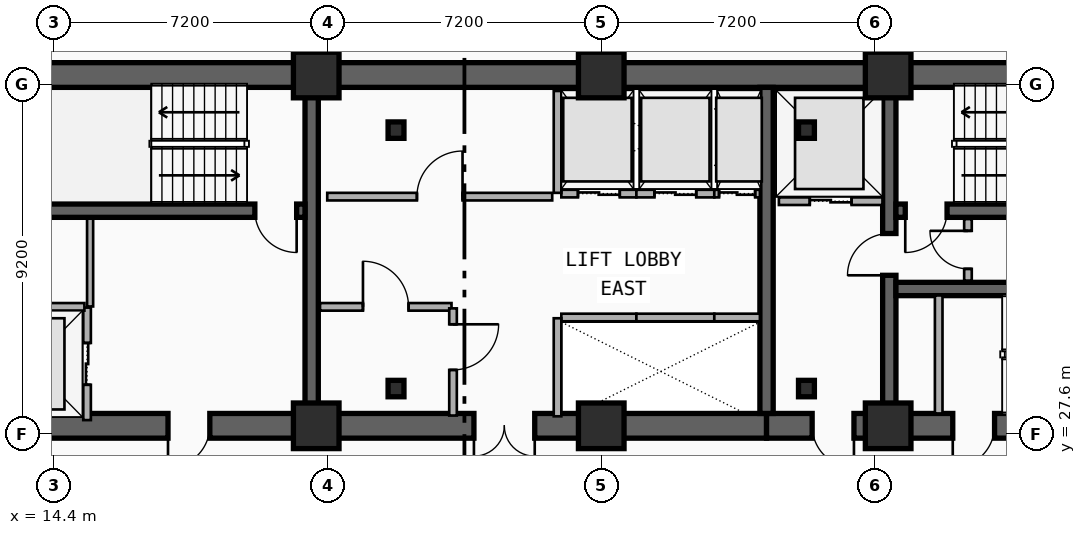
"""IFC4 building model, lengths in metres.
Left out: names, types, materials, properties, quantities, classifications, styles, units other than length and angle.
Written with IfcOpenShell. Run it as: python <this file> out.ifc"""

import sys

from ifc_helpers import new_model, si_unit, direction, frame, frame_2d, origin, origin_2d, place, context, subcontext, project, spatial, rectangle, i_section, extrude, element, fill, save


model = new_model("IFC4")
c1 = context("Model", 3, precision=1e-05, world=origin(), true_north=direction((0.0, 1.0)))
c2 = subcontext(c1, "Body", "Model", "MODEL_VIEW")
j1 = project(units=[si_unit("LENGTHUNIT", "METRE"), si_unit("PLANEANGLEUNIT", "RADIAN")], contexts=[c1])
p1 = place(None, origin())
s1 = spatial("IfcSite", under=j1, at=p1, CompositionType="ELEMENT")
p2 = place(p1, origin())
s2 = spatial("IfcBuilding", under=s1, at=p2, CompositionType="ELEMENT")
p3 = place(p2, frame((0.0, 0.0, 97.8)))
s3 = spatial("IfcBuildingStorey", under=s2, at=p3, CompositionType="ELEMENT", Elevation=97.8)
p4 = place(p3, frame((12.15, 37.05, 0.0), z_axis=(0.0, 0.0, 1.0), x_axis=(1.0, 0.0, 0.0)))
e1 = element("IfcWall", 1, at=p4, inside=s3, PredefinedType="SHEAR", context=c2, shape_type="SweptSolid", body=[
    extrude(rectangle(XDim=33.23, YDim=0.65, at=frame_2d((16.615, 0.0))), origin(), (0.0, 0.0, 1.0), 3.5),
])
p5 = place(p3, frame((21.18, 27.82, 0.0), z_axis=(0.0, 0.0, 1.0), x_axis=(-1.0, 0.0, 0.0)))
e2 = element("IfcWall", 2, at=p5, inside=s3, PredefinedType="SHEAR", context=c2, shape_type="SweptSolid", body=[
    extrude(rectangle(XDim=9.03, YDim=0.65, at=frame_2d((4.515, 0.0))), origin(), (0.0, 0.0, 1.0), 3.5),
])
p6 = place(p5, frame((2.68, 0.0, 0.0)))
e3 = element("IfcOpeningElement", 3, at=p6, cuts=e2, PredefinedType="OPENING", context=c2, shape_type="SweptSolid", body=[
    extrude(rectangle(XDim=1.1, YDim=2.15, at=frame_2d((0.55, 1.075))), frame((0.0, 0.335, 0.0), z_axis=(0.0, -1.0, 0.0), x_axis=(1.0, 0.0, 0.0)), (0.0, 0.0, 1.0), 0.67),
])
p7 = place(p3, frame((33.15, 27.82, 0.0), z_axis=(0.0, 0.0, 1.0), x_axis=(-1.0, 0.0, 0.0)))
e4 = element("IfcWall", 4, at=p7, inside=s3, PredefinedType="SHEAR", context=c2, shape_type="SweptSolid", body=[
    extrude(rectangle(XDim=11.97, YDim=0.65, at=frame_2d((5.985, 0.0))), origin(), (0.0, 0.0, 1.0), 3.5),
])
p8 = place(p7, frame((6.1, 0.0, 0.0)))
e5 = element("IfcOpeningElement", 5, at=p8, cuts=e4, PredefinedType="OPENING", context=c2, shape_type="SweptSolid", body=[
    extrude(rectangle(XDim=1.6, YDim=2.2, at=frame_2d((0.8, 1.1))), frame((0.0, 0.335, 0.0), z_axis=(0.0, -1.0, 0.0), x_axis=(1.0, 0.0, 0.0)), (0.0, 0.0, 1.0), 0.67),
])
p9 = place(p3, frame((45.38, 27.82, 0.0), z_axis=(0.0, 0.0, 1.0), x_axis=(-1.0, 0.0, 0.0)))
e6 = element("IfcWall", 6, at=p9, inside=s3, PredefinedType="SHEAR", context=c2, shape_type="SweptSolid", body=[
    extrude(rectangle(XDim=12.23, YDim=0.65, at=frame_2d((6.115, 0.0))), origin(), (0.0, 0.0, 1.0), 3.5),
])
p10 = place(p9, frame((9.93, 0.0, 0.0)))
e7 = element("IfcOpeningElement", 7, at=p10, cuts=e6, PredefinedType="OPENING", context=c2, shape_type="SweptSolid", body=[
    extrude(rectangle(XDim=1.1, YDim=2.15, at=frame_2d((0.55, 1.075))), frame((0.0, 0.335, 0.0), z_axis=(0.0, -1.0, 0.0), x_axis=(1.0, 0.0, 0.0)), (0.0, 0.0, 1.0), 0.67),
])
p11 = place(p9, frame((6.23, 0.0, 0.0)))
e8 = element("IfcOpeningElement", 8, at=p11, cuts=e6, PredefinedType="OPENING", context=c2, shape_type="SweptSolid", body=[
    extrude(rectangle(XDim=1.1, YDim=2.15, at=frame_2d((0.55, 1.075))), frame((0.0, 0.335, 0.0), z_axis=(0.0, -1.0, 0.0), x_axis=(1.0, 0.0, 0.0)), (0.0, 0.0, 1.0), 0.67),
])
for number, where, z_axis, x_axis in (
    (9, (21.18, 28.145, 0.0), (0.0, 0.0, 1.0), (0.0, 1.0, 0.0)),
    (10, (33.15, 28.145, 0.0), (0.0, 0.0, 1.0), (0.0, 1.0, 0.0)),
):
    element("IfcWall", number, at=place(p3, frame(where, z_axis=z_axis, x_axis=x_axis)), inside=s3, PredefinedType="SHEAR", context=c2, shape_type="SweptSolid", body=[
        extrude(rectangle(XDim=8.58, YDim=0.35, at=frame_2d((4.29, 0.0))), origin(), (0.0, 0.0, 1.0), 3.5),
    ])
p12 = place(p3, frame((36.38, 28.145, 0.0), z_axis=(0.0, 0.0, 1.0), x_axis=(0.0, 1.0, 0.0)))
e11 = element("IfcWall", 11, at=p12, inside=s3, PredefinedType="SHEAR", context=c2, shape_type="SweptSolid", body=[
    extrude(rectangle(XDim=8.58, YDim=0.35, at=frame_2d((4.29, 0.0))), origin(), (0.0, 0.0, 1.0), 3.5),
])
p13 = place(p12, frame((3.635, 0.0, 0.0)))
e12 = element("IfcOpeningElement", 12, at=p13, cuts=e11, PredefinedType="OPENING", context=c2, shape_type="SweptSolid", body=[
    extrude(rectangle(XDim=1.1, YDim=2.15, at=frame_2d((0.55, 1.075))), frame((0.0, 0.185, 0.0), z_axis=(0.0, -1.0, 0.0), x_axis=(1.0, 0.0, 0.0)), (0.0, 0.0, 1.0), 0.37),
])
p14 = place(p3, frame((21.005, 33.48, 0.0), z_axis=(0.0, 0.0, 1.0), x_axis=(-1.0, 0.0, 0.0)))
e13 = element("IfcWall", 13, at=p14, inside=s3, PredefinedType="SHEAR", context=c2, shape_type="SweptSolid", body=[
    extrude(rectangle(XDim=8.53, YDim=0.35, at=frame_2d((4.265, 0.0))), origin(), (0.0, 0.0, 1.0), 3.5),
])
p15 = place(p14, frame((0.22, 0.0, 0.0)))
e14 = element("IfcOpeningElement", 14, at=p15, cuts=e13, PredefinedType="OPENING", context=c2, shape_type="SweptSolid", body=[
    extrude(rectangle(XDim=1.1, YDim=2.15, at=frame_2d((0.55, 1.075))), frame((0.0, 0.185, 0.0), z_axis=(0.0, -1.0, 0.0), x_axis=(1.0, 0.0, 0.0)), (0.0, 0.0, 1.0), 0.37),
])
p16 = place(p3, frame((45.055, 33.48, 0.0), z_axis=(0.0, 0.0, 1.0), x_axis=(-1.0, 0.0, 0.0)))
e15 = element("IfcWall", 15, at=p16, inside=s3, PredefinedType="SHEAR", context=c2, shape_type="SweptSolid", body=[
    extrude(rectangle(XDim=8.5, YDim=0.35, at=frame_2d((4.25, 0.0))), origin(), (0.0, 0.0, 1.0), 3.5),
])
p17 = place(p16, frame((7.155, 0.0, 0.0)))
e16 = element("IfcOpeningElement", 16, at=p17, cuts=e15, PredefinedType="OPENING", context=c2, shape_type="SweptSolid", body=[
    extrude(rectangle(XDim=1.1, YDim=2.15, at=frame_2d((0.55, 1.075))), frame((0.0, 0.185, 0.0), z_axis=(0.0, -1.0, 0.0), x_axis=(1.0, 0.0, 0.0)), (0.0, 0.0, 1.0), 0.37),
])
p18 = place(p3, frame((36.555, 31.42, 0.0), z_axis=(0.0, 0.0, 1.0), x_axis=(1.0, 0.0, 0.0)))
e17 = element("IfcWall", 17, at=p18, inside=s3, PredefinedType="SHEAR", context=c2, shape_type="SweptSolid", body=[
    extrude(rectangle(XDim=8.5, YDim=0.35, at=frame_2d((4.25, 0.0))), origin(), (0.0, 0.0, 1.0), 3.5),
])
for number, where, z_axis, x_axis in (
    (18, (23.4, 28.8, 0.0), (0.0, 0.0, 1.0), (1.0, 0.0, 0.0)),
    (19, (34.2, 28.8, 0.0), (0.0, 0.0, 1.0), (1.0, 0.0, 0.0)),
    (20, (34.2, 35.6, 0.0), (0.0, 0.0, 1.0), (1.0, 0.0, 0.0)),
    (21, (23.4, 35.6, 0.0), (0.0, 0.0, 1.0), (1.0, 0.0, 0.0)),
):
    element("IfcColumn", number, at=place(p3, frame(where, z_axis=z_axis, x_axis=x_axis)), inside=s3, PredefinedType="COLUMN", context=c2, shape_type="SweptSolid", body=[
        extrude(i_section(OverallWidth=0.418, OverallDepth=0.432, WebThickness=0.035, FlangeThickness=0.056, FilletRadius=0.015, at=origin_2d()), origin(), (0.0, 0.0, 1.0), 3.5),
    ])
for number, where, z_axis, x_axis in (
    (22, (21.3, 27.82, 0.0), (0.0, 0.0, 1.0), (1.0, 0.0, 0.0)),
    (23, (21.3, 37.05, 0.0), (0.0, 0.0, 1.0), (1.0, 0.0, 0.0)),
    (24, (28.8, 27.82, 0.0), (0.0, 0.0, 1.0), (1.0, 0.0, 0.0)),
    (25, (28.8, 37.05, 0.0), (0.0, 0.0, 1.0), (1.0, 0.0, 0.0)),
    (26, (36.35, 27.82, 0.0), (0.0, 0.0, 1.0), (1.0, 0.0, 0.0)),
    (27, (36.35, 37.05, 0.0), (0.0, 0.0, 1.0), (1.0, 0.0, 0.0)),
):
    element("IfcColumn", number, at=place(p3, frame(where, z_axis=z_axis, x_axis=x_axis)), inside=s3, PredefinedType="COLUMN", context=c2, shape_type="SweptSolid", body=[
        extrude(rectangle(XDim=1.2, YDim=1.2, at=origin_2d()), origin(), (0.0, 0.0, 1.0), 3.5),
    ])
p19 = place(p3, frame((15.27, 27.97, 0.0), z_axis=(0.0, 0.0, 1.0), x_axis=(0.0, 1.0, 0.0)))
e28 = element("IfcWall", 28, at=p19, inside=s3, PredefinedType="PARTITIONING", context=c2, shape_type="SweptSolid", body=[
    extrude(rectangle(XDim=2.96, YDim=0.2, at=frame_2d((1.48, 0.0))), origin(), (0.0, 0.0, 1.0), 2.212),
])
p20 = place(p19, frame((0.93, 0.0, 0.0)))
e29 = element("IfcOpeningElement", 29, at=p20, cuts=e28, PredefinedType="OPENING", context=c2, shape_type="SweptSolid", body=[
    extrude(rectangle(XDim=1.1, YDim=2.15, at=frame_2d((0.55, 1.075))), frame((0.0, 0.11, 0.0), z_axis=(0.0, -1.0, 0.0), x_axis=(1.0, 0.0, 0.0)), (0.0, 0.0, 1.0), 0.22),
])
p21 = place(p3, frame((12.45, 30.95, 0.0), z_axis=(0.0, 0.0, 1.0), x_axis=(1.0, 0.0, 0.0)))
e30 = element("IfcWall", 30, at=p21, inside=s3, PredefinedType="PARTITIONING", context=c2, shape_type="SweptSolid", body=[
    extrude(rectangle(XDim=2.75, YDim=0.2, at=frame_2d((1.375, 0.0))), origin(), (0.0, 0.0, 1.0), 2.212),
])
p22 = place(p3, frame((33.475, 33.73, 0.0), z_axis=(0.0, 0.0, 1.0), x_axis=(1.0, 0.0, 0.0)))
e31 = element("IfcWall", 31, at=p22, inside=s3, PredefinedType="PARTITIONING", context=c2, shape_type="SweptSolid", body=[
    extrude(rectangle(XDim=2.725, YDim=0.2, at=frame_2d((1.362, 0.0))), origin(), (0.0, 0.0, 1.0), 2.212),
])
p23 = place(p22, frame((0.812, 0.0, 0.0)))
e32 = element("IfcOpeningElement", 32, at=p23, cuts=e31, PredefinedType="OPENING", context=c2, shape_type="SweptSolid", body=[
    extrude(rectangle(XDim=1.1, YDim=2.15, at=frame_2d((0.55, 1.075))), frame((0.0, 0.11, 0.0), z_axis=(0.0, -1.0, 0.0), x_axis=(1.0, 0.0, 0.0)), (0.0, 0.0, 1.0), 0.22),
])
p24 = place(p3, frame((27.75, 30.67, 0.0), z_axis=(0.0, 0.0, 1.0), x_axis=(1.0, 0.0, 0.0)))
e33 = element("IfcWall", 33, at=p24, inside=s3, PredefinedType="PARTITIONING", context=c2, shape_type="SweptSolid", body=[
    extrude(rectangle(XDim=1.975, YDim=0.2, at=frame_2d((0.988, 0.0))), origin(), (0.0, 0.0, 1.0), 2.212),
])
p25 = place(p3, frame((27.65, 28.07, 0.0), z_axis=(0.0, 0.0, 1.0), x_axis=(0.0, 1.0, 0.0)))
e34 = element("IfcWall", 34, at=p25, inside=s3, PredefinedType="PARTITIONING", context=c2, shape_type="SweptSolid", body=[
    extrude(rectangle(XDim=2.58, YDim=0.2, at=frame_2d((1.29, 0.0))), origin(), (0.0, 0.0, 1.0), 2.212),
])
p26 = place(p3, frame((29.725, 30.67, 0.0), z_axis=(0.0, 0.0, 1.0), x_axis=(1.0, 0.0, 0.0)))
e35 = element("IfcWall", 35, at=p26, inside=s3, PredefinedType="PARTITIONING", context=c2, shape_type="SweptSolid", body=[
    extrude(rectangle(XDim=2.05, YDim=0.2, at=frame_2d((1.025, 0.0))), origin(), (0.0, 0.0, 1.0), 2.62),
])
p27 = place(p3, frame((31.775, 30.67, 0.0), z_axis=(0.0, 0.0, 1.0), x_axis=(1.0, 0.0, 0.0)))
e36 = element("IfcWall", 36, at=p27, inside=s3, PredefinedType="PARTITIONING", context=c2, shape_type="SweptSolid", body=[
    extrude(rectangle(XDim=1.2, YDim=0.2, at=frame_2d((0.6, 0.0))), origin(), (0.0, 0.0, 1.0), 2.62),
])
p28 = place(p3, frame((27.75, 33.93, 0.0), z_axis=(0.0, 0.0, 1.0), x_axis=(1.0, 0.0, 0.0)))
e37 = element("IfcWall", 37, at=p28, inside=s3, PredefinedType="PARTITIONING", context=c2, shape_type="SweptSolid", body=[
    extrude(rectangle(XDim=1.975, YDim=0.2, at=frame_2d((0.988, 0.0))), origin(), (0.0, 0.0, 1.0), 2.212),
])
p29 = place(p28, frame((0.438, 0.0, 0.0)))
e38 = element("IfcOpeningElement", 38, at=p29, cuts=e37, PredefinedType="OPENING", context=c2, shape_type="SweptSolid", body=[
    extrude(rectangle(XDim=1.1, YDim=2.15, at=frame_2d((0.55, 1.075))), frame((0.0, 0.11, 0.0), z_axis=(0.0, -1.0, 0.0), x_axis=(1.0, 0.0, 0.0)), (0.0, 0.0, 1.0), 0.22),
])
p30 = place(p3, frame((27.65, 33.95, 0.0), z_axis=(0.0, 0.0, 1.0), x_axis=(0.0, 1.0, 0.0)))
e39 = element("IfcWall", 39, at=p30, inside=s3, PredefinedType="PARTITIONING", context=c2, shape_type="SweptSolid", body=[
    extrude(rectangle(XDim=2.68, YDim=0.2, at=frame_2d((1.34, 0.0))), origin(), (0.0, 0.0, 1.0), 2.212),
])
p31 = place(p3, frame((29.725, 33.93, 0.0), z_axis=(0.0, 0.0, 1.0), x_axis=(1.0, 0.0, 0.0)))
e40 = element("IfcWall", 40, at=p31, inside=s3, PredefinedType="PARTITIONING", context=c2, shape_type="SweptSolid", body=[
    extrude(rectangle(XDim=2.05, YDim=0.2, at=frame_2d((1.025, 0.0))), origin(), (0.0, 0.0, 1.0), 3.24),
])
p32 = place(p31, frame((0.475, 0.0, 0.0)))
e41 = element("IfcOpeningElement", 41, at=p32, cuts=e40, PredefinedType="OPENING", context=c2, shape_type="SweptSolid", body=[
    extrude(rectangle(XDim=1.1, YDim=2.15, at=frame_2d((0.55, 1.075))), frame((0.0, 0.11, 0.0), z_axis=(0.0, -1.0, 0.0), x_axis=(1.0, 0.0, 0.0)), (0.0, 0.0, 1.0), 0.22),
])
p33 = place(p3, frame((31.775, 33.93, 0.0), z_axis=(0.0, 0.0, 1.0), x_axis=(1.0, 0.0, 0.0)))
e42 = element("IfcWall", 42, at=p33, inside=s3, PredefinedType="PARTITIONING", context=c2, shape_type="SweptSolid", body=[
    extrude(rectangle(XDim=1.2, YDim=0.2, at=frame_2d((0.6, 0.0))), origin(), (0.0, 0.0, 1.0), 3.24),
])
p34 = place(p33, frame((0.125, 0.0, 0.0)))
e43 = element("IfcOpeningElement", 43, at=p34, cuts=e42, PredefinedType="OPENING", context=c2, shape_type="SweptSolid", body=[
    extrude(rectangle(XDim=0.95, YDim=2.15, at=frame_2d((0.475, 1.075))), frame((0.0, 0.11, 0.0), z_axis=(0.0, -1.0, 0.0), x_axis=(1.0, 0.0, 0.0)), (0.0, 0.0, 1.0), 0.22),
])
p35 = place(p3, frame((37.68, 28.145, 0.0), z_axis=(0.0, 0.0, 1.0), x_axis=(0.0, 1.0, 0.0)))
e44 = element("IfcWall", 44, at=p35, inside=s3, PredefinedType="PARTITIONING", context=c2, shape_type="SweptSolid", body=[
    extrude(rectangle(XDim=3.105, YDim=0.2, at=frame_2d((1.552, 0.0))), origin(), (0.0, 0.0, 1.0), 2.62),
])
p36 = place(p3, frame((38.45, 31.64, 0.0), z_axis=(0.0, 0.0, 1.0), x_axis=(0.0, 1.0, 0.0)))
e45 = element("IfcWall", 45, at=p36, inside=s3, PredefinedType="PARTITIONING", context=c2, shape_type="SweptSolid", body=[
    extrude(rectangle(XDim=1.62, YDim=0.2, at=frame_2d((0.81, 0.0))), origin(), (0.0, 0.0, 1.0), 3.24),
])
p37 = place(p36, frame((0.31, 0.0, 0.0)))
e46 = element("IfcOpeningElement", 46, at=p37, cuts=e45, PredefinedType="OPENING", context=c2, shape_type="SweptSolid", body=[
    extrude(rectangle(XDim=1.0, YDim=2.15, at=frame_2d((0.5, 1.075))), frame((0.0, 0.11, 0.0), z_axis=(0.0, -1.0, 0.0), x_axis=(1.0, 0.0, 0.0)), (0.0, 0.0, 1.0), 0.22),
])
p38 = place(p3, frame((21.4, 30.95, 0.0), z_axis=(0.0, 0.0, 1.0), x_axis=(1.0, 0.0, 0.0)))
e47 = element("IfcWall", 47, at=p38, inside=s3, PredefinedType="PARTITIONING", context=c2, shape_type="SweptSolid", body=[
    extrude(rectangle(XDim=3.46, YDim=0.2, at=frame_2d((1.73, 0.0))), origin(), (0.0, 0.0, 1.0), 2.28),
])
p39 = place(p38, frame((1.13, 0.0, 0.0)))
e48 = element("IfcOpeningElement", 48, at=p39, cuts=e47, PredefinedType="OPENING", context=c2, shape_type="SweptSolid", body=[
    extrude(rectangle(XDim=1.2, YDim=2.15, at=frame_2d((0.6, 1.075))), frame((0.0, 0.11, 0.0), z_axis=(0.0, -1.0, 0.0), x_axis=(1.0, 0.0, 0.0)), (0.0, 0.0, 1.0), 0.22),
])
p40 = place(p3, frame((21.59, 33.85, 0.0), z_axis=(0.0, 0.0, 1.0), x_axis=(1.0, 0.0, 0.0)))
e49 = element("IfcWall", 49, at=p40, inside=s3, PredefinedType="PARTITIONING", context=c2, shape_type="SweptSolid", body=[
    extrude(rectangle(XDim=5.92, YDim=0.2, at=frame_2d((2.96, 0.0))), origin(), (0.0, 0.0, 1.0), 2.28),
])
p41 = place(p40, frame((2.36, 0.0, 0.0)))
e50 = element("IfcOpeningElement", 50, at=p41, cuts=e49, PredefinedType="OPENING", context=c2, shape_type="SweptSolid", body=[
    extrude(rectangle(XDim=1.2, YDim=2.15, at=frame_2d((0.6, 1.075))), frame((0.0, 0.11, 0.0), z_axis=(0.0, -1.0, 0.0), x_axis=(1.0, 0.0, 0.0)), (0.0, 0.0, 1.0), 0.22),
])
p42 = place(p3, frame((24.9, 30.91, 0.0), z_axis=(0.0, 0.0, 1.0), x_axis=(0.0, -1.0, 0.0)))
e51 = element("IfcWall", 51, at=p42, inside=s3, PredefinedType="PARTITIONING", context=c2, shape_type="SweptSolid", body=[
    extrude(rectangle(XDim=2.82, YDim=0.2, at=frame_2d((1.41, 0.0))), origin(), (0.0, 0.0, 1.0), 2.62),
])
p43 = place(p42, frame((0.419, 0.0, 0.0)))
e52 = element("IfcOpeningElement", 52, at=p43, cuts=e51, PredefinedType="OPENING", context=c2, shape_type="SweptSolid", body=[
    extrude(rectangle(XDim=1.2, YDim=2.15, at=frame_2d((0.6, 1.075))), frame((0.0, 0.11, 0.0), z_axis=(0.0, -1.0, 0.0), x_axis=(1.0, 0.0, 0.0)), (0.0, 0.0, 1.0), 0.22),
])
p44 = place(p3, frame((15.35, 30.96, 0.0), z_axis=(0.0, 0.0, 1.0), x_axis=(0.0, 1.0, 0.0)))
e53 = element("IfcWall", 53, at=p44, inside=s3, PredefinedType="PARTITIONING", context=c2, shape_type="SweptSolid", body=[
    extrude(rectangle(XDim=2.31, YDim=0.16, at=frame_2d((1.155, 0.0))), origin(), (0.0, 0.0, 1.0), 3.24),
])
p45 = place(p20, origin())
e54 = element("IfcDoor", 54, at=p45, inside=s3, OperationType="DOUBLE_DOOR_SLIDING", PredefinedType="DOOR", context=c2, shape_type="SweptSolid", body=[
    extrude(rectangle(XDim=1.1, YDim=2.15, at=frame_2d((0.55, 1.075))), frame((0.0, 0.025, 0.0), z_axis=(0.0, -1.0, 0.0), x_axis=(1.0, 0.0, 0.0)), (0.0, 0.0, 1.0), 0.05),
])
fill(e29, e54)
p46 = place(p23, origin())
e55 = element("IfcDoor", 55, at=p46, inside=s3, OperationType="DOUBLE_DOOR_SLIDING", PredefinedType="DOOR", context=c2, shape_type="SweptSolid", body=[
    extrude(rectangle(XDim=1.1, YDim=2.15, at=frame_2d((0.55, 1.075))), frame((0.0, 0.025, 0.0), z_axis=(0.0, -1.0, 0.0), x_axis=(1.0, 0.0, 0.0)), (0.0, 0.0, 1.0), 0.05),
])
fill(e32, e55)
p47 = place(p29, origin())
e56 = element("IfcDoor", 56, at=p47, inside=s3, OperationType="DOUBLE_DOOR_SLIDING", PredefinedType="DOOR", context=c2, shape_type="SweptSolid", body=[
    extrude(rectangle(XDim=1.1, YDim=2.15, at=frame_2d((0.55, 1.075))), frame((0.0, 0.025, 0.0), z_axis=(0.0, -1.0, 0.0), x_axis=(1.0, 0.0, 0.0)), (0.0, 0.0, 1.0), 0.05),
])
fill(e38, e56)
p48 = place(p32, origin())
e57 = element("IfcDoor", 57, at=p48, inside=s3, OperationType="DOUBLE_DOOR_SLIDING", PredefinedType="DOOR", context=c2, shape_type="SweptSolid", body=[
    extrude(rectangle(XDim=1.1, YDim=2.15, at=frame_2d((0.55, 1.075))), frame((0.0, 0.025, 0.0), z_axis=(0.0, -1.0, 0.0), x_axis=(1.0, 0.0, 0.0)), (0.0, 0.0, 1.0), 0.05),
])
fill(e41, e57)
p49 = place(p34, origin())
e58 = element("IfcDoor", 58, at=p49, inside=s3, OperationType="DOUBLE_DOOR_SLIDING", PredefinedType="DOOR", context=c2, shape_type="SweptSolid", body=[
    extrude(rectangle(XDim=0.95, YDim=2.15, at=frame_2d((0.475, 1.075))), frame((0.0, 0.025, 0.0), z_axis=(0.0, -1.0, 0.0), x_axis=(1.0, 0.0, 0.0)), (0.0, 0.0, 1.0), 0.05),
])
fill(e43, e58)
p50 = place(p15, origin())
e59 = element("IfcDoor", 59, at=p50, inside=s3, OperationType="SINGLE_SWING_LEFT", PredefinedType="DOOR", context=c2, shape_type="SweptSolid", body=[
    extrude(rectangle(XDim=1.1, YDim=2.15, at=frame_2d((0.55, 1.075))), frame((0.0, 0.025, 0.0), z_axis=(0.0, -1.0, 0.0), x_axis=(1.0, 0.0, 0.0)), (0.0, 0.0, 1.0), 0.05),
])
fill(e14, e59)
p51 = place(p6, origin())
e60 = element("IfcDoor", 60, at=p51, inside=s3, OperationType="SINGLE_SWING_RIGHT", PredefinedType="DOOR", context=c2, shape_type="SweptSolid", body=[
    extrude(rectangle(XDim=1.1, YDim=2.15, at=frame_2d((0.55, 1.075))), frame((0.0, 0.025, 0.0), z_axis=(0.0, -1.0, 0.0), x_axis=(1.0, 0.0, 0.0)), (0.0, 0.0, 1.0), 0.05),
])
fill(e3, e60)
p52 = place(p17, origin())
e61 = element("IfcDoor", 61, at=p52, inside=s3, OperationType="SINGLE_SWING_RIGHT", PredefinedType="DOOR", context=c2, shape_type="SweptSolid", body=[
    extrude(rectangle(XDim=1.1, YDim=2.15, at=frame_2d((0.55, 1.075))), frame((0.0, 0.025, 0.0), z_axis=(0.0, -1.0, 0.0), x_axis=(1.0, 0.0, 0.0)), (0.0, 0.0, 1.0), 0.05),
])
fill(e16, e61)
p53 = place(p13, origin())
e62 = element("IfcDoor", 62, at=p53, inside=s3, OperationType="SINGLE_SWING_LEFT", PredefinedType="DOOR", context=c2, shape_type="SweptSolid", body=[
    extrude(rectangle(XDim=1.1, YDim=2.15, at=frame_2d((0.55, 1.075))), frame((0.0, 0.025, 0.0), z_axis=(0.0, -1.0, 0.0), x_axis=(1.0, 0.0, 0.0)), (0.0, 0.0, 1.0), 0.05),
])
fill(e12, e62)
p54 = place(p10, origin())
e63 = element("IfcDoor", 63, at=p54, inside=s3, OperationType="SINGLE_SWING_LEFT", PredefinedType="DOOR", context=c2, shape_type="SweptSolid", body=[
    extrude(rectangle(XDim=1.1, YDim=2.15, at=frame_2d((0.55, 1.075))), frame((0.0, 0.025, 0.0), z_axis=(0.0, -1.0, 0.0), x_axis=(1.0, 0.0, 0.0)), (0.0, 0.0, 1.0), 0.05),
])
fill(e7, e63)
p55 = place(p11, origin())
e64 = element("IfcDoor", 64, at=p55, inside=s3, OperationType="SINGLE_SWING_RIGHT", PredefinedType="DOOR", context=c2, shape_type="SweptSolid", body=[
    extrude(rectangle(XDim=1.1, YDim=2.15, at=frame_2d((0.55, 1.075))), frame((0.0, 0.025, 0.0), z_axis=(0.0, -1.0, 0.0), x_axis=(1.0, 0.0, 0.0)), (0.0, 0.0, 1.0), 0.05),
])
fill(e8, e64)
p56 = place(p8, origin())
e65 = element("IfcDoor", 65, at=p56, inside=s3, OperationType="SINGLE_SWING_LEFT", PredefinedType="DOOR", context=c2, shape_type="SweptSolid", body=[
    extrude(rectangle(XDim=1.6, YDim=2.2, at=frame_2d((0.8, 1.1))), frame((0.0, 0.025, 0.0), z_axis=(0.0, -1.0, 0.0), x_axis=(1.0, 0.0, 0.0)), (0.0, 0.0, 1.0), 0.05),
])
fill(e5, e65)
p57 = place(p37, origin())
e66 = element("IfcDoor", 66, at=p57, inside=s3, OperationType="SINGLE_SWING_RIGHT", PredefinedType="DOOR", context=c2, shape_type="SweptSolid", body=[
    extrude(rectangle(XDim=1.0, YDim=2.15, at=frame_2d((0.5, 1.075))), frame((0.0, 0.025, 0.0), z_axis=(0.0, -1.0, 0.0), x_axis=(1.0, 0.0, 0.0)), (0.0, 0.0, 1.0), 0.05),
])
fill(e46, e66)
p58 = place(p39, origin())
e67 = element("IfcDoor", 67, at=p58, inside=s3, OperationType="SINGLE_SWING_LEFT", PredefinedType="DOOR", context=c2, shape_type="SweptSolid", body=[
    extrude(rectangle(XDim=1.2, YDim=2.15, at=frame_2d((0.6, 1.075))), frame((0.0, 0.025, 0.0), z_axis=(0.0, -1.0, 0.0), x_axis=(1.0, 0.0, 0.0)), (0.0, 0.0, 1.0), 0.05),
])
fill(e48, e67)
p59 = place(p41, origin())
e68 = element("IfcDoor", 68, at=p59, inside=s3, OperationType="SINGLE_SWING_RIGHT", PredefinedType="DOOR", context=c2, shape_type="SweptSolid", body=[
    extrude(rectangle(XDim=1.2, YDim=2.15, at=frame_2d((0.6, 1.075))), frame((0.0, 0.025, 0.0), z_axis=(0.0, -1.0, 0.0), x_axis=(1.0, 0.0, 0.0)), (0.0, 0.0, 1.0), 0.05),
])
fill(e50, e68)
p60 = place(p43, origin())
e69 = element("IfcDoor", 69, at=p60, inside=s3, OperationType="SINGLE_SWING_LEFT", PredefinedType="DOOR", context=c2, shape_type="SweptSolid", body=[
    extrude(rectangle(XDim=1.2, YDim=2.15, at=frame_2d((0.6, 1.075))), frame((0.0, 0.025, 0.0), z_axis=(0.0, -1.0, 0.0), x_axis=(1.0, 0.0, 0.0)), (0.0, 0.0, 1.0), 0.05),
])
fill(e52, e69)
save(model, sys.argv[1])
